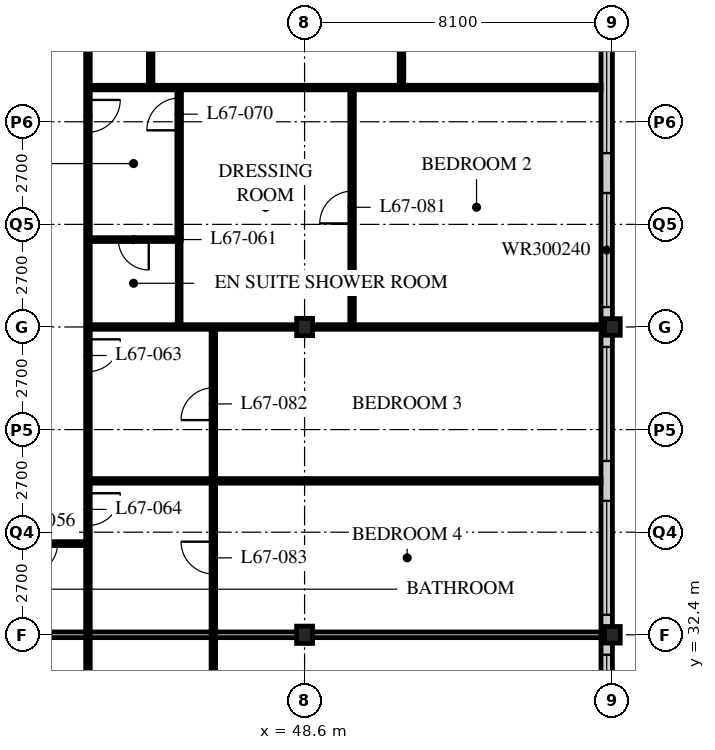
"""IFC4 building model, lengths in metres.
Left out: names, types, materials, properties, quantities, classifications, styles, units other than length and angle.
Written with IfcOpenShell. Run it as: python <this file> out.ifc"""

import sys

from ifc_helpers import new_model, si_unit, direction, frame, frame_2d, origin, origin_2d, place, context, subcontext, project, spatial, rectangle, i_section, extrude, element, fill, save


model = new_model("IFC4")
c1 = context("Model", 3, precision=1e-05, world=origin(), true_north=direction((0.0, 1.0)))
c2 = subcontext(c1, "Body", "Model", "MODEL_VIEW")
j1 = project(units=[si_unit("LENGTHUNIT", "METRE"), si_unit("PLANEANGLEUNIT", "RADIAN")], contexts=[c1])
p1 = place(None, origin())
s1 = spatial("IfcSite", under=j1, at=p1, CompositionType="ELEMENT")
p2 = place(p1, origin())
s2 = spatial("IfcBuilding", under=s1, at=p2, CompositionType="ELEMENT")
p3 = place(p2, frame((0.0, 0.0, 261.9)))
s3 = spatial("IfcBuildingStorey", under=s2, at=p3, CompositionType="ELEMENT", Elevation=261.9)
for number, where, z_axis, x_axis in (
    (1, (48.6, 32.4, 0.0), (0.0, 0.0, 1.0), (1.0, 0.0, 0.0)),
    (2, (48.6, 40.5, 0.0), (0.0, 0.0, 1.0), (1.0, 0.0, 0.0)),
):
    element("IfcColumn", number, at=place(p3, frame(where, z_axis=z_axis, x_axis=x_axis)), inside=s3, PredefinedType="COLUMN", context=c2, shape_type="SweptSolid", body=[
        extrude(i_section(OverallWidth=0.418, OverallDepth=0.456, WebThickness=0.042, FlangeThickness=0.067, FilletRadius=0.015, at=origin_2d()), origin(), (0.0, 0.0, 1.0), 3.9),
    ])
for number, where, z_axis, x_axis in (
    (3, (56.7, 32.4, 0.0), (0.0, 0.0, 1.0), (1.0, 0.0, 0.0)),
    (4, (56.7, 40.5, 0.0), (0.0, 0.0, 1.0), (1.0, 0.0, 0.0)),
):
    element("IfcColumn", number, at=place(p3, frame(where, z_axis=z_axis, x_axis=x_axis)), inside=s3, PredefinedType="COLUMN", context=c2, shape_type="SweptSolid", body=[
        extrude(i_section(OverallWidth=0.412, OverallDepth=0.437, WebThickness=0.036, FlangeThickness=0.058, FilletRadius=0.015, at=origin_2d()), origin(), (0.0, 0.0, 1.0), 3.9),
    ])
p4 = place(p3, frame((56.55, 24.6, 0.0), z_axis=(0.0, 0.0, 1.0), x_axis=(0.0, 1.0, 0.0)))
e5 = element("IfcWall", 5, at=p4, inside=s3, PredefinedType="SOLIDWALL", context=c2, shape_type="SweptSolid", body=[
    extrude(rectangle(XDim=32.1, YDim=0.3, at=frame_2d((16.05, 0.0))), origin(), (0.0, 0.0, 1.0), 3.69),
])
p5 = place(p4, frame((0.225, 0.0, 0.6)))
e6 = element("IfcOpeningElement", 6, at=p5, cuts=e5, PredefinedType="OPENING", context=c2, shape_type="SweptSolid", body=[
    extrude(rectangle(XDim=3.0, YDim=2.4, at=frame_2d((1.5, 1.2))), frame((0.0, 0.16, 0.0), z_axis=(0.0, -1.0, 0.0), x_axis=(1.0, 0.0, 0.0)), (0.0, 0.0, 1.0), 0.32),
])
p6 = place(p4, frame((4.275, 0.0, 0.6)))
e7 = element("IfcOpeningElement", 7, at=p6, cuts=e5, PredefinedType="OPENING", context=c2, shape_type="SweptSolid", body=[
    extrude(rectangle(XDim=3.0, YDim=2.4, at=frame_2d((1.5, 1.2))), frame((0.0, 0.16, 0.0), z_axis=(0.0, -1.0, 0.0), x_axis=(1.0, 0.0, 0.0)), (0.0, 0.0, 1.0), 0.32),
])
p7 = place(p4, frame((8.325, 0.0, 0.6)))
e8 = element("IfcOpeningElement", 8, at=p7, cuts=e5, PredefinedType="OPENING", context=c2, shape_type="SweptSolid", body=[
    extrude(rectangle(XDim=3.0, YDim=2.4, at=frame_2d((1.5, 1.2))), frame((0.0, 0.16, 0.0), z_axis=(0.0, -1.0, 0.0), x_axis=(1.0, 0.0, 0.0)), (0.0, 0.0, 1.0), 0.32),
])
p8 = place(p4, frame((12.375, 0.0, 0.6)))
e9 = element("IfcOpeningElement", 9, at=p8, cuts=e5, PredefinedType="OPENING", context=c2, shape_type="SweptSolid", body=[
    extrude(rectangle(XDim=3.0, YDim=2.4, at=frame_2d((1.5, 1.2))), frame((0.0, 0.16, 0.0), z_axis=(0.0, -1.0, 0.0), x_axis=(1.0, 0.0, 0.0)), (0.0, 0.0, 1.0), 0.32),
])
p9 = place(p4, frame((16.425, 0.0, 0.6)))
e10 = element("IfcOpeningElement", 10, at=p9, cuts=e5, PredefinedType="OPENING", context=c2, shape_type="SweptSolid", body=[
    extrude(rectangle(XDim=3.0, YDim=2.4, at=frame_2d((1.5, 1.2))), frame((0.0, 0.16, 0.0), z_axis=(0.0, -1.0, 0.0), x_axis=(1.0, 0.0, 0.0)), (0.0, 0.0, 1.0), 0.32),
])
p10 = place(p4, frame((20.475, 0.0, 0.6)))
e11 = element("IfcOpeningElement", 11, at=p10, cuts=e5, PredefinedType="OPENING", context=c2, shape_type="SweptSolid", body=[
    extrude(rectangle(XDim=3.0, YDim=2.4, at=frame_2d((1.5, 1.2))), frame((0.0, 0.16, 0.0), z_axis=(0.0, -1.0, 0.0), x_axis=(1.0, 0.0, 0.0)), (0.0, 0.0, 1.0), 0.32),
])
p11 = place(p4, frame((24.525, 0.0, 0.6)))
e12 = element("IfcOpeningElement", 12, at=p11, cuts=e5, PredefinedType="OPENING", context=c2, shape_type="SweptSolid", body=[
    extrude(rectangle(XDim=3.0, YDim=2.4, at=frame_2d((1.5, 1.2))), frame((0.0, 0.16, 0.0), z_axis=(0.0, -1.0, 0.0), x_axis=(1.0, 0.0, 0.0)), (0.0, 0.0, 1.0), 0.32),
])
p12 = place(p4, frame((28.575, 0.0, 0.6)))
e13 = element("IfcOpeningElement", 13, at=p12, cuts=e5, PredefinedType="OPENING", context=c2, shape_type="SweptSolid", body=[
    extrude(rectangle(XDim=3.0, YDim=2.4, at=frame_2d((1.5, 1.2))), frame((0.0, 0.16, 0.0), z_axis=(0.0, -1.0, 0.0), x_axis=(1.0, 0.0, 0.0)), (0.0, 0.0, 1.0), 0.32),
])
p13 = place(p3, frame((42.9, 22.5, 0.0), z_axis=(0.0, 0.0, 1.0), x_axis=(0.0, 1.0, 0.0)))
e14 = element("IfcWall", 14, at=p13, inside=s3, PredefinedType="PARTITIONING", context=c2, shape_type="SweptSolid", body=[
    extrude(rectangle(XDim=9.9, YDim=0.12, at=frame_2d((4.95, 0.0))), origin(), (0.0, 0.0, 1.0), 3.69),
])
p14 = place(p13, frame((2.125, 0.0, 0.0)))
e15 = element("IfcOpeningElement", 15, at=p14, cuts=e14, PredefinedType="OPENING", context=c2, shape_type="SweptSolid", body=[
    extrude(rectangle(XDim=0.85, YDim=2.1, at=frame_2d((0.425, 1.05))), frame((0.0, 0.07, 0.0), z_axis=(0.0, -1.0, 0.0), x_axis=(1.0, 0.0, 0.0)), (0.0, 0.0, 1.0), 0.14),
])
p15 = place(p13, frame((6.175, 0.0, 0.0)))
e16 = element("IfcOpeningElement", 16, at=p15, cuts=e14, PredefinedType="OPENING", context=c2, shape_type="SweptSolid", body=[
    extrude(rectangle(XDim=0.85, YDim=2.1, at=frame_2d((0.425, 1.05))), frame((0.0, 0.07, 0.0), z_axis=(0.0, -1.0, 0.0), x_axis=(1.0, 0.0, 0.0)), (0.0, 0.0, 1.0), 0.14),
])
p16 = place(p3, frame((40.5, 32.4, 0.0), z_axis=(0.0, 0.0, 1.0), x_axis=(1.0, 0.0, 0.0)))
e17 = element("IfcWall", 17, at=p16, inside=s3, PredefinedType="PARTITIONING", context=c2, shape_type="SweptSolid", body=[
    extrude(rectangle(XDim=15.9, YDim=0.15, at=frame_2d((7.95, 0.0))), origin(), (0.0, 0.0, 1.0), 3.078),
])
p17 = place(p3, frame((40.5, 34.8, 0.0), z_axis=(0.0, 0.0, 1.0), x_axis=(1.0, 0.0, 0.0)))
e18 = element("IfcWall", 18, at=p17, inside=s3, PredefinedType="PARTITIONING", context=c2, shape_type="SweptSolid", body=[
    extrude(rectangle(XDim=2.4, YDim=0.1, at=frame_2d((1.2, 0.0))), origin(), (0.0, 0.0, 1.0), 3.69),
])
p18 = place(p17, frame((0.8, 0.0, 0.0)))
e19 = element("IfcOpeningElement", 19, at=p18, cuts=e18, PredefinedType="OPENING", context=c2, shape_type="SweptSolid", body=[
    extrude(rectangle(XDim=0.8, YDim=2.1, at=frame_2d((0.4, 1.05))), frame((0.0, 0.06, 0.0), z_axis=(0.0, -1.0, 0.0), x_axis=(1.0, 0.0, 0.0)), (0.0, 0.0, 1.0), 0.12),
])
p19 = place(p3, frame((42.9, 48.6, 0.0), z_axis=(0.0, 0.0, 1.0), x_axis=(0.0, -1.0, 0.0)))
e20 = element("IfcWall", 20, at=p19, inside=s3, PredefinedType="PARTITIONING", context=c2, shape_type="SweptSolid", body=[
    extrude(rectangle(XDim=16.2, YDim=0.12, at=frame_2d((8.1, 0.0))), origin(), (0.0, 0.0, 1.0), 3.69),
])
p20 = place(p19, frame((2.125, 0.0, 0.0)))
e21 = element("IfcOpeningElement", 21, at=p20, cuts=e20, PredefinedType="OPENING", context=c2, shape_type="SweptSolid", body=[
    extrude(rectangle(XDim=0.85, YDim=2.1, at=frame_2d((0.425, 1.05))), frame((0.0, 0.07, 0.0), z_axis=(0.0, -1.0, 0.0), x_axis=(1.0, 0.0, 0.0)), (0.0, 0.0, 1.0), 0.14),
])
p21 = place(p19, frame((8.425, 0.0, 0.0)))
e22 = element("IfcOpeningElement", 22, at=p21, cuts=e20, PredefinedType="OPENING", context=c2, shape_type="SweptSolid", body=[
    extrude(rectangle(XDim=0.85, YDim=2.1, at=frame_2d((0.425, 1.05))), frame((0.0, 0.07, 0.0), z_axis=(0.0, -1.0, 0.0), x_axis=(1.0, 0.0, 0.0)), (0.0, 0.0, 1.0), 0.14),
])
p22 = place(p19, frame((12.475, 0.0, 0.0)))
e23 = element("IfcOpeningElement", 23, at=p22, cuts=e20, PredefinedType="OPENING", context=c2, shape_type="SweptSolid", body=[
    extrude(rectangle(XDim=0.85, YDim=2.1, at=frame_2d((0.425, 1.05))), frame((0.0, 0.07, 0.0), z_axis=(0.0, -1.0, 0.0), x_axis=(1.0, 0.0, 0.0)), (0.0, 0.0, 1.0), 0.14),
])
p23 = place(p3, frame((42.9, 46.8, 0.0), z_axis=(0.0, 0.0, 1.0), x_axis=(1.0, 0.0, 0.0)))
e24 = element("IfcWall", 24, at=p23, inside=s3, PredefinedType="PARTITIONING", context=c2, shape_type="SweptSolid", body=[
    extrude(rectangle(XDim=13.5, YDim=0.12, at=frame_2d((6.75, 0.0))), origin(), (0.0, 0.0, 1.0), 3.69),
])
p24 = place(p3, frame((44.55, 64.5, 0.0), z_axis=(0.0, 0.0, 1.0), x_axis=(0.0, -1.0, 0.0)))
e25 = element("IfcWall", 25, at=p24, inside=s3, PredefinedType="PARTITIONING", context=c2, shape_type="SweptSolid", body=[
    extrude(rectangle(XDim=17.7, YDim=0.12, at=frame_2d((8.85, 0.0))), origin(), (0.0, 0.0, 1.0), 3.69),
])
p25 = place(p24, frame((12.475, 0.0, 0.0)))
e26 = element("IfcOpeningElement", 26, at=p25, cuts=e25, PredefinedType="OPENING", context=c2, shape_type="SweptSolid", body=[
    extrude(rectangle(XDim=0.85, YDim=2.1, at=frame_2d((0.425, 1.05))), frame((0.0, 0.07, 0.0), z_axis=(0.0, -1.0, 0.0), x_axis=(1.0, 0.0, 0.0)), (0.0, 0.0, 1.0), 0.14),
])
p26 = place(p24, frame((4.525, 0.0, 0.0)))
e27 = element("IfcOpeningElement", 27, at=p26, cuts=e25, PredefinedType="OPENING", context=c2, shape_type="SweptSolid", body=[
    extrude(rectangle(XDim=0.85, YDim=2.1, at=frame_2d((0.425, 1.05))), frame((0.0, 0.07, 0.0), z_axis=(0.0, -1.0, 0.0), x_axis=(1.0, 0.0, 0.0)), (0.0, 0.0, 1.0), 0.14),
])
p27 = place(p3, frame((42.9, 42.8, 0.0), z_axis=(0.0, 0.0, 1.0), x_axis=(1.0, 0.0, 0.0)))
e28 = element("IfcWall", 28, at=p27, inside=s3, PredefinedType="PARTITIONING", context=c2, shape_type="SweptSolid", body=[
    extrude(rectangle(XDim=2.4, YDim=0.1, at=frame_2d((1.2, 0.0))), origin(), (0.0, 0.0, 1.0), 3.69),
])
p28 = place(p27, frame((0.8, 0.0, 0.0)))
e29 = element("IfcOpeningElement", 29, at=p28, cuts=e28, PredefinedType="OPENING", context=c2, shape_type="SweptSolid", body=[
    extrude(rectangle(XDim=0.8, YDim=2.1, at=frame_2d((0.4, 1.05))), frame((0.0, 0.06, 0.0), z_axis=(0.0, -1.0, 0.0), x_axis=(1.0, 0.0, 0.0)), (0.0, 0.0, 1.0), 0.12),
])
p29 = place(p3, frame((45.3, 42.8, 0.0), z_axis=(0.0, 0.0, 1.0), x_axis=(0.0, -1.0, 0.0)))
e30 = element("IfcWall", 30, at=p29, inside=s3, PredefinedType="PARTITIONING", context=c2, shape_type="SweptSolid", body=[
    extrude(rectangle(XDim=2.3, YDim=0.1, at=frame_2d((1.15, 0.0))), origin(), (0.0, 0.0, 1.0), 3.69),
])
p30 = place(p3, frame((42.9, 40.5, 0.0), z_axis=(0.0, 0.0, 1.0), x_axis=(1.0, 0.0, 0.0)))
e31 = element("IfcWall", 31, at=p30, inside=s3, PredefinedType="PARTITIONING", context=c2, shape_type="SweptSolid", body=[
    extrude(rectangle(XDim=13.5, YDim=0.12, at=frame_2d((6.75, 0.0))), origin(), (0.0, 0.0, 1.0), 3.078),
])
p31 = place(p3, frame((42.9, 36.45, 0.0), z_axis=(0.0, 0.0, 1.0), x_axis=(1.0, 0.0, 0.0)))
e32 = element("IfcWall", 32, at=p31, inside=s3, PredefinedType="PARTITIONING", context=c2, shape_type="SweptSolid", body=[
    extrude(rectangle(XDim=13.5, YDim=0.12, at=frame_2d((6.75, 0.0))), origin(), (0.0, 0.0, 1.0), 3.69),
])
p32 = place(p3, frame((45.3, 46.8, 0.0), z_axis=(0.0, 0.0, 1.0), x_axis=(0.0, -1.0, 0.0)))
e33 = element("IfcWall", 33, at=p32, inside=s3, PredefinedType="PARTITIONING", context=c2, shape_type="SweptSolid", body=[
    extrude(rectangle(XDim=4.01, YDim=0.12, at=frame_2d((2.005, 0.0))), origin(), (0.0, 0.0, 1.0), 3.69),
])
p33 = place(p32, frame((0.275, 0.0, 0.0)))
e34 = element("IfcOpeningElement", 34, at=p33, cuts=e33, PredefinedType="OPENING", context=c2, shape_type="SweptSolid", body=[
    extrude(rectangle(XDim=0.85, YDim=2.1, at=frame_2d((0.425, 1.05))), frame((0.0, 0.07, 0.0), z_axis=(0.0, -1.0, 0.0), x_axis=(1.0, 0.0, 0.0)), (0.0, 0.0, 1.0), 0.14),
])
p34 = place(p3, frame((46.2, 28.35, 0.0), z_axis=(0.0, 0.0, 1.0), x_axis=(0.0, 1.0, 0.0)))
e35 = element("IfcWall", 35, at=p34, inside=s3, PredefinedType="PARTITIONING", context=c2, shape_type="SweptSolid", body=[
    extrude(rectangle(XDim=12.15, YDim=0.12, at=frame_2d((6.075, 0.0))), origin(), (0.0, 0.0, 1.0), 3.69),
])
p35 = place(p34, frame((1.6, 0.0, 0.0)))
e36 = element("IfcOpeningElement", 36, at=p35, cuts=e35, PredefinedType="OPENING", context=c2, shape_type="SweptSolid", body=[
    extrude(rectangle(XDim=0.85, YDim=2.1, at=frame_2d((0.425, 1.05))), frame((0.0, 0.07, 0.0), z_axis=(0.0, -1.0, 0.0), x_axis=(1.0, 0.0, 0.0)), (0.0, 0.0, 1.0), 0.14),
])
p36 = place(p34, frame((9.7, 0.0, 0.0)))
e37 = element("IfcOpeningElement", 37, at=p36, cuts=e35, PredefinedType="OPENING", context=c2, shape_type="SweptSolid", body=[
    extrude(rectangle(XDim=0.85, YDim=2.1, at=frame_2d((0.425, 1.05))), frame((0.0, 0.07, 0.0), z_axis=(0.0, -1.0, 0.0), x_axis=(1.0, 0.0, 0.0)), (0.0, 0.0, 1.0), 0.14),
])
p37 = place(p34, frame((5.65, 0.0, 0.0)))
e38 = element("IfcOpeningElement", 38, at=p37, cuts=e35, PredefinedType="OPENING", context=c2, shape_type="SweptSolid", body=[
    extrude(rectangle(XDim=0.85, YDim=2.1, at=frame_2d((0.425, 1.05))), frame((0.0, 0.07, 0.0), z_axis=(0.0, -1.0, 0.0), x_axis=(1.0, 0.0, 0.0)), (0.0, 0.0, 1.0), 0.14),
])
p38 = place(p3, frame((51.15, 46.8, 0.0), z_axis=(0.0, 0.0, 1.0), x_axis=(0.0, 1.0, 0.0)))
e39 = element("IfcWall", 39, at=p38, inside=s3, PredefinedType="PARTITIONING", context=c2, shape_type="SweptSolid", body=[
    extrude(rectangle(XDim=7.8, YDim=0.12, at=frame_2d((3.9, 0.0))), origin(), (0.0, 0.0, 1.0), 3.69),
])
p39 = place(p38, frame((3.475, 0.0, 0.0)))
e40 = element("IfcOpeningElement", 40, at=p39, cuts=e39, PredefinedType="OPENING", context=c2, shape_type="SweptSolid", body=[
    extrude(rectangle(XDim=0.85, YDim=2.1, at=frame_2d((0.425, 1.05))), frame((0.0, 0.07, 0.0), z_axis=(0.0, -1.0, 0.0), x_axis=(1.0, 0.0, 0.0)), (0.0, 0.0, 1.0), 0.14),
])
p40 = place(p3, frame((49.85, 40.5, 0.0), z_axis=(0.0, 0.0, 1.0), x_axis=(0.0, 1.0, 0.0)))
e41 = element("IfcWall", 41, at=p40, inside=s3, PredefinedType="PARTITIONING", context=c2, shape_type="SweptSolid", body=[
    extrude(rectangle(XDim=6.3, YDim=0.12, at=frame_2d((3.15, 0.0))), origin(), (0.0, 0.0, 1.0), 3.69),
])
p41 = place(p40, frame((2.725, 0.0, 0.0)))
e42 = element("IfcOpeningElement", 42, at=p41, cuts=e41, PredefinedType="OPENING", context=c2, shape_type="SweptSolid", body=[
    extrude(rectangle(XDim=0.85, YDim=2.1, at=frame_2d((0.425, 1.05))), frame((0.0, 0.07, 0.0), z_axis=(0.0, -1.0, 0.0), x_axis=(1.0, 0.0, 0.0)), (0.0, 0.0, 1.0), 0.14),
])
p42 = place(p6, origin())
e43 = element("IfcWindow", 43, at=p42, inside=s3, PartitioningType="SINGLE_PANEL", PredefinedType="WINDOW", context=c2, shape_type="SweptSolid", body=[
    extrude(rectangle(XDim=3.0, YDim=2.4, at=frame_2d((1.5, 1.2))), frame((0.0, 0.03, 0.0), z_axis=(0.0, -1.0, 0.0), x_axis=(1.0, 0.0, 0.0)), (0.0, 0.0, 1.0), 0.06),
])
fill(e7, e43)
p43 = place(p7, origin())
e44 = element("IfcWindow", 44, at=p43, inside=s3, PartitioningType="SINGLE_PANEL", PredefinedType="WINDOW", context=c2, shape_type="SweptSolid", body=[
    extrude(rectangle(XDim=3.0, YDim=2.4, at=frame_2d((1.5, 1.2))), frame((0.0, 0.03, 0.0), z_axis=(0.0, -1.0, 0.0), x_axis=(1.0, 0.0, 0.0)), (0.0, 0.0, 1.0), 0.06),
])
fill(e8, e44)
p44 = place(p8, origin())
e45 = element("IfcWindow", 45, at=p44, inside=s3, PartitioningType="SINGLE_PANEL", PredefinedType="WINDOW", context=c2, shape_type="SweptSolid", body=[
    extrude(rectangle(XDim=3.0, YDim=2.4, at=frame_2d((1.5, 1.2))), frame((0.0, 0.03, 0.0), z_axis=(0.0, -1.0, 0.0), x_axis=(1.0, 0.0, 0.0)), (0.0, 0.0, 1.0), 0.06),
])
fill(e9, e45)
p45 = place(p9, origin())
e46 = element("IfcWindow", 46, at=p45, inside=s3, PartitioningType="SINGLE_PANEL", PredefinedType="WINDOW", context=c2, shape_type="SweptSolid", body=[
    extrude(rectangle(XDim=3.0, YDim=2.4, at=frame_2d((1.5, 1.2))), frame((0.0, 0.03, 0.0), z_axis=(0.0, -1.0, 0.0), x_axis=(1.0, 0.0, 0.0)), (0.0, 0.0, 1.0), 0.06),
])
fill(e10, e46)
p46 = place(p10, origin())
e47 = element("IfcWindow", 47, at=p46, inside=s3, PartitioningType="SINGLE_PANEL", PredefinedType="WINDOW", context=c2, shape_type="SweptSolid", body=[
    extrude(rectangle(XDim=3.0, YDim=2.4, at=frame_2d((1.5, 1.2))), frame((0.0, 0.03, 0.0), z_axis=(0.0, -1.0, 0.0), x_axis=(1.0, 0.0, 0.0)), (0.0, 0.0, 1.0), 0.06),
])
fill(e11, e47)
p47 = place(p18, origin())
e48 = element("IfcDoor", 48, at=p47, inside=s3, OperationType="SINGLE_SWING_RIGHT", PredefinedType="DOOR", context=c2, shape_type="SweptSolid", body=[
    extrude(rectangle(XDim=0.8, YDim=2.1, at=frame_2d((0.4, 1.05))), frame((0.0, 0.025, 0.0), z_axis=(0.0, -1.0, 0.0), x_axis=(1.0, 0.0, 0.0)), (0.0, 0.0, 1.0), 0.05),
])
fill(e19, e48)
p48 = place(p28, origin())
e49 = element("IfcDoor", 49, at=p48, inside=s3, OperationType="SINGLE_SWING_LEFT", PredefinedType="DOOR", context=c2, shape_type="SweptSolid", body=[
    extrude(rectangle(XDim=0.8, YDim=2.1, at=frame_2d((0.4, 1.05))), frame((0.0, 0.025, 0.0), z_axis=(0.0, -1.0, 0.0), x_axis=(1.0, 0.0, 0.0)), (0.0, 0.0, 1.0), 0.05),
])
fill(e29, e49)
p49 = place(p20, origin())
e50 = element("IfcDoor", 50, at=p49, inside=s3, OperationType="SINGLE_SWING_LEFT", PredefinedType="DOOR", context=c2, shape_type="SweptSolid", body=[
    extrude(rectangle(XDim=0.85, YDim=2.1, at=frame_2d((0.425, 1.05))), frame((0.0, 0.025, 0.0), z_axis=(0.0, -1.0, 0.0), x_axis=(1.0, 0.0, 0.0)), (0.0, 0.0, 1.0), 0.05),
])
fill(e21, e50)
p50 = place(p21, origin())
e51 = element("IfcDoor", 51, at=p50, inside=s3, OperationType="SINGLE_SWING_LEFT", PredefinedType="DOOR", context=c2, shape_type="SweptSolid", body=[
    extrude(rectangle(XDim=0.85, YDim=2.1, at=frame_2d((0.425, 1.05))), frame((0.0, 0.025, 0.0), z_axis=(0.0, -1.0, 0.0), x_axis=(1.0, 0.0, 0.0)), (0.0, 0.0, 1.0), 0.05),
])
fill(e22, e51)
p51 = place(p22, origin())
e52 = element("IfcDoor", 52, at=p51, inside=s3, OperationType="SINGLE_SWING_LEFT", PredefinedType="DOOR", context=c2, shape_type="SweptSolid", body=[
    extrude(rectangle(XDim=0.85, YDim=2.1, at=frame_2d((0.425, 1.05))), frame((0.0, 0.025, 0.0), z_axis=(0.0, -1.0, 0.0), x_axis=(1.0, 0.0, 0.0)), (0.0, 0.0, 1.0), 0.05),
])
fill(e23, e52)
p52 = place(p33, origin())
e53 = element("IfcDoor", 53, at=p52, inside=s3, OperationType="SINGLE_SWING_LEFT", PredefinedType="DOOR", context=c2, shape_type="SweptSolid", body=[
    extrude(rectangle(XDim=0.85, YDim=2.1, at=frame_2d((0.425, 1.05))), frame((0.0, 0.025, 0.0), z_axis=(0.0, -1.0, 0.0), x_axis=(1.0, 0.0, 0.0)), (0.0, 0.0, 1.0), 0.05),
])
fill(e34, e53)
p53 = place(p41, origin())
e54 = element("IfcDoor", 54, at=p53, inside=s3, OperationType="SINGLE_SWING_LEFT", PredefinedType="DOOR", context=c2, shape_type="SweptSolid", body=[
    extrude(rectangle(XDim=0.85, YDim=2.1, at=frame_2d((0.425, 1.05))), frame((0.0, 0.025, 0.0), z_axis=(0.0, -1.0, 0.0), x_axis=(1.0, 0.0, 0.0)), (0.0, 0.0, 1.0), 0.05),
])
fill(e42, e54)
p54 = place(p36, origin())
e55 = element("IfcDoor", 55, at=p54, inside=s3, OperationType="SINGLE_SWING_LEFT", PredefinedType="DOOR", context=c2, shape_type="SweptSolid", body=[
    extrude(rectangle(XDim=0.85, YDim=2.1, at=frame_2d((0.425, 1.05))), frame((0.0, 0.025, 0.0), z_axis=(0.0, -1.0, 0.0), x_axis=(1.0, 0.0, 0.0)), (0.0, 0.0, 1.0), 0.05),
])
fill(e37, e55)
p55 = place(p37, origin())
e56 = element("IfcDoor", 56, at=p55, inside=s3, OperationType="SINGLE_SWING_RIGHT", PredefinedType="DOOR", context=c2, shape_type="SweptSolid", body=[
    extrude(rectangle(XDim=0.85, YDim=2.1, at=frame_2d((0.425, 1.05))), frame((0.0, 0.025, 0.0), z_axis=(0.0, -1.0, 0.0), x_axis=(1.0, 0.0, 0.0)), (0.0, 0.0, 1.0), 0.05),
])
fill(e38, e56)
save(model, sys.argv[1])
